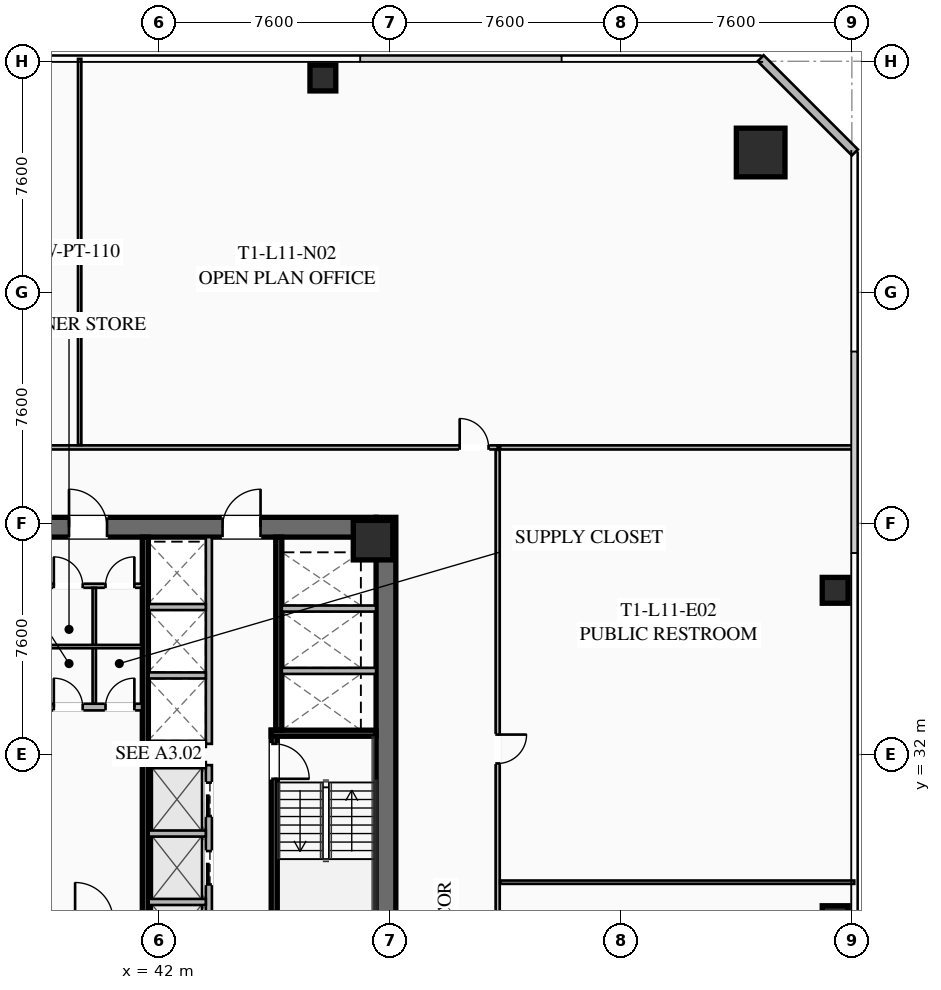
"""IFC4 building model, lengths in metres.
Left out: names, types, materials, properties, quantities, classifications, styles, units other than length and angle.
Written with IfcOpenShell. Run it as: python <this file> out.ifc"""

import sys

from ifc_helpers import new_model, si_unit, direction, frame, frame_2d, origin, origin_2d, place, context, subcontext, project, spatial, rectangle, hollow_rectangle, extrude, element, fill, save


model = new_model("IFC4")
c1 = context("Model", 3, precision=1e-05, world=origin(), true_north=direction((0.0, 1.0)))
c2 = subcontext(c1, "Body", "Model", "MODEL_VIEW")
j1 = project(units=[si_unit("LENGTHUNIT", "METRE"), si_unit("PLANEANGLEUNIT", "RADIAN")], contexts=[c1])
p1 = place(None, origin())
s1 = spatial("IfcSite", under=j1, at=p1, CompositionType="ELEMENT")
p2 = place(p1, origin())
s2 = spatial("IfcBuilding", under=s1, at=p2, CompositionType="ELEMENT")
p3 = place(p2, frame((0.0, 0.0, 45.9)))
s3 = spatial("IfcBuildingStorey", under=s2, at=p3, CompositionType="ELEMENT", Elevation=45.9)
p4 = place(p3, frame((49.475, 39.8, 0.0), z_axis=(0.0, 0.0, 1.0), x_axis=(0.0, -1.0, 0.0)))
e1 = element("IfcWall", 1, at=p4, inside=s3, PredefinedType="SHEAR", context=c2, shape_type="SweptSolid", body=[
    extrude(rectangle(XDim=15.6, YDim=0.65, at=frame_2d((7.8, 0.0))), origin(), (0.0, 0.0, 1.0), 3.55),
])
p5 = place(p3, frame((34.85, 39.475, 0.0), z_axis=(0.0, 0.0, 1.0), x_axis=(1.0, 0.0, 0.0)))
e2 = element("IfcWall", 2, at=p5, inside=s3, PredefinedType="SHEAR", context=c2, shape_type="SweptSolid", body=[
    extrude(rectangle(XDim=14.3, YDim=0.65, at=frame_2d((7.15, 0.0))), origin(), (0.0, 0.0, 1.0), 3.55),
])
p6 = place(p5, frame((4.2, 0.0, 0.0)))
e3 = element("IfcOpeningElement", 3, at=p6, cuts=e2, PredefinedType="OPENING", context=c2, shape_type="SweptSolid", body=[
    extrude(rectangle(XDim=1.25, YDim=2.25, at=frame_2d((0.625, 1.125))), frame((0.0, 0.335, 0.0), z_axis=(0.0, -1.0, 0.0), x_axis=(1.0, 0.0, 0.0)), (0.0, 0.0, 1.0), 0.67),
])
p7 = place(p5, frame((9.25, 0.0, 0.0)))
e4 = element("IfcOpeningElement", 4, at=p7, cuts=e2, PredefinedType="OPENING", context=c2, shape_type="SweptSolid", body=[
    extrude(rectangle(XDim=1.25, YDim=2.25, at=frame_2d((0.625, 1.125))), frame((0.0, 0.335, 0.0), z_axis=(0.0, -1.0, 0.0), x_axis=(1.0, 0.0, 0.0)), (0.0, 0.0, 1.0), 0.67),
])
p8 = place(p3, frame((49.05, 39.05, 0.0), z_axis=(0.0, 0.0, 1.0), x_axis=(1.0, 0.0, 0.0)))
e5 = element("IfcColumn", 5, at=p8, inside=s3, PredefinedType="COLUMN", context=c2, shape_type="SweptSolid", body=[
    extrude(hollow_rectangle(XDim=1.3, YDim=1.3, WallThickness=0.05, at=origin_2d()), origin(), (0.0, 0.0, 1.0), 3.35),
])
p9 = place(p3, frame((61.8, 51.8, 0.0), z_axis=(0.0, 0.0, 1.0), x_axis=(1.0, 0.0, 0.0)))
e6 = element("IfcColumn", 6, at=p9, inside=s3, PredefinedType="COLUMN", context=c2, shape_type="SweptSolid", body=[
    extrude(hollow_rectangle(XDim=1.6, YDim=1.6, WallThickness=0.06, at=origin_2d()), origin(), (0.0, 0.0, 1.0), 3.35),
])
for number, where, z_axis, x_axis in (
    (7, (64.25, 26.6, 0.0), (0.0, 0.0, 1.0), (1.0, 0.0, 0.0)),
    (8, (64.25, 37.4, 0.0), (0.0, 0.0, 1.0), (1.0, 0.0, 0.0)),
    (9, (47.4, 54.25, 0.0), (0.0, 0.0, 1.0), (1.0, 0.0, 0.0)),
):
    element("IfcColumn", number, at=place(p3, frame(where, z_axis=z_axis, x_axis=x_axis)), inside=s3, PredefinedType="COLUMN", context=c2, shape_type="SweptSolid", body=[
        extrude(hollow_rectangle(XDim=0.85, YDim=0.85, WallThickness=0.035, at=origin_2d()), origin(), (0.0, 0.0, 1.0), 3.35),
    ])
p10 = place(p3, frame((61.8, 54.9, 0.0), z_axis=(0.0, 0.0, 1.0), x_axis=(0.707106781187, -0.707106781187, 0.0)))
e10 = element("IfcWall", 10, at=p10, inside=s3, PredefinedType="SOLIDWALL", context=c2, shape_type="SweptSolid", body=[
    extrude(rectangle(XDim=4.384, YDim=0.28, at=frame_2d((2.192, 0.0))), origin(), (0.0, 0.0, 1.0), 3.35),
])
p11 = place(p3, frame((45.8, 32.8, 0.0), z_axis=(0.0, 0.0, 1.0), x_axis=(0.0, -1.0, 0.0)))
e11 = element("IfcWall", 11, at=p11, inside=s3, PredefinedType="SHEAR", context=c2, shape_type="SweptSolid", body=[
    extrude(rectangle(XDim=7.95, YDim=0.2, at=frame_2d((3.975, 0.0))), origin(), (0.0, 0.0, 1.0), 3.35),
])
p12 = place(p11, frame((0.45, 0.0, 0.0)))
e12 = element("IfcOpeningElement", 12, at=p12, cuts=e11, PredefinedType="OPENING", context=c2, shape_type="SweptSolid", body=[
    extrude(rectangle(XDim=1.15, YDim=2.2, at=frame_2d((0.575, 1.1))), frame((0.0, 0.11, 0.0), z_axis=(0.0, -1.0, 0.0), x_axis=(1.0, 0.0, 0.0)), (0.0, 0.0, 1.0), 0.22),
])
p13 = place(p3, frame((45.7, 32.7, 0.0), z_axis=(0.0, 0.0, 1.0), x_axis=(1.0, 0.0, 0.0)))
e13 = element("IfcWall", 13, at=p13, inside=s3, PredefinedType="SHEAR", context=c2, shape_type="SweptSolid", body=[
    extrude(rectangle(XDim=3.45, YDim=0.2, at=frame_2d((1.725, 0.0))), origin(), (0.0, 0.0, 1.0), 3.35),
])
p14 = place(p3, frame((41.56, 24.85, 0.0), z_axis=(0.0, 0.0, 1.0), x_axis=(0.0, 1.0, 0.0)))
e14 = element("IfcWall", 14, at=p14, inside=s3, PredefinedType="SHEAR", context=c2, shape_type="SweptSolid", body=[
    extrude(rectangle(XDim=14.3, YDim=0.2, at=frame_2d((7.15, 0.0))), origin(), (0.0, 0.0, 1.0), 3.35),
])
p15 = place(p3, frame((38.3, 33.56, 0.0), z_axis=(0.0, 0.0, 1.0), x_axis=(1.0, 0.0, 0.0)))
e15 = element("IfcWall", 15, at=p15, inside=s3, PredefinedType="SOLIDWALL", context=c2, shape_type="SweptSolid", body=[
    extrude(rectangle(XDim=3.15, YDim=0.22, at=frame_2d((1.575, 0.0))), origin(), (0.0, 0.0, 1.0), 2.703),
])
p16 = place(p15, frame((0.25, 0.0, 0.0)))
e16 = element("IfcOpeningElement", 16, at=p16, cuts=e15, PredefinedType="OPENING", context=c2, shape_type="SweptSolid", body=[
    extrude(rectangle(XDim=0.95, YDim=2.05, at=frame_2d((0.475, 1.025))), frame((0.0, 0.12, 0.0), z_axis=(0.0, -1.0, 0.0), x_axis=(1.0, 0.0, 0.0)), (0.0, 0.0, 1.0), 0.24),
])
p17 = place(p15, frame((1.95, 0.0, 0.0)))
e17 = element("IfcOpeningElement", 17, at=p17, cuts=e15, PredefinedType="OPENING", context=c2, shape_type="SweptSolid", body=[
    extrude(rectangle(XDim=0.95, YDim=2.05, at=frame_2d((0.475, 1.025))), frame((0.0, 0.12, 0.0), z_axis=(0.0, -1.0, 0.0), x_axis=(1.0, 0.0, 0.0)), (0.0, 0.0, 1.0), 0.24),
])
p18 = place(p3, frame((45.95, 39.15, 0.0), z_axis=(0.0, 0.0, 1.0), x_axis=(0.0, -1.0, 0.0)))
e18 = element("IfcWall", 18, at=p18, inside=s3, PredefinedType="SHEAR", context=c2, shape_type="SweptSolid", body=[
    extrude(rectangle(XDim=6.35, YDim=0.2, at=frame_2d((3.175, 0.0))), origin(), (0.0, 0.0, 1.0), 3.35),
])
for number, where, z_axis, x_axis in (
    (19, (46.05, 34.75, 0.0), (0.0, 0.0, 1.0), (1.0, 0.0, 0.0)),
    (20, (46.05, 36.8, 0.0), (0.0, 0.0, 1.0), (1.0, 0.0, 0.0)),
):
    element("IfcWall", number, at=place(p3, frame(where, z_axis=z_axis, x_axis=x_axis)), inside=s3, PredefinedType="SOLIDWALL", context=c2, shape_type="SweptSolid", body=[
        extrude(rectangle(XDim=3.1, YDim=0.2, at=frame_2d((1.55, 0.0))), origin(), (0.0, 0.0, 1.0), 3.35),
    ])
p19 = place(p3, frame((38.3, 37.55, 0.0), z_axis=(0.0, 0.0, 1.0), x_axis=(1.0, 0.0, 0.0)))
e21 = element("IfcWall", 21, at=p19, inside=s3, PredefinedType="PARTITIONING", context=c2, shape_type="SweptSolid", body=[
    extrude(rectangle(XDim=3.15, YDim=0.135, at=frame_2d((1.575, 0.0))), origin(), (0.0, 0.0, 1.0), 2.703),
])
p20 = place(p19, frame((0.25, 0.0, 0.0)))
e22 = element("IfcOpeningElement", 22, at=p20, cuts=e21, PredefinedType="OPENING", context=c2, shape_type="SweptSolid", body=[
    extrude(rectangle(XDim=0.95, YDim=2.05, at=frame_2d((0.475, 1.025))), frame((0.0, 0.077, 0.0), z_axis=(0.0, -1.0, 0.0), x_axis=(1.0, 0.0, 0.0)), (0.0, 0.0, 1.0), 0.155),
])
p21 = place(p19, frame((1.95, 0.0, 0.0)))
e23 = element("IfcOpeningElement", 23, at=p21, cuts=e21, PredefinedType="OPENING", context=c2, shape_type="SweptSolid", body=[
    extrude(rectangle(XDim=0.95, YDim=2.05, at=frame_2d((0.475, 1.025))), frame((0.0, 0.077, 0.0), z_axis=(0.0, -1.0, 0.0), x_axis=(1.0, 0.0, 0.0)), (0.0, 0.0, 1.0), 0.155),
])
p22 = place(p3, frame((39.88, 33.68, 0.0), z_axis=(0.0, 0.0, 1.0), x_axis=(0.0, 1.0, 0.0)))
e24 = element("IfcWall", 24, at=p22, inside=s3, PredefinedType="PARTITIONING", context=c2, shape_type="SweptSolid", body=[
    extrude(rectangle(XDim=3.8, YDim=0.11, at=frame_2d((1.9, 0.0))), origin(), (0.0, 0.0, 1.0), 2.703),
])
p23 = place(p3, frame((38.3, 35.55, 0.0), z_axis=(0.0, 0.0, 1.0), x_axis=(1.0, 0.0, 0.0)))
e25 = element("IfcWall", 25, at=p23, inside=s3, PredefinedType="PARTITIONING", context=c2, shape_type="SweptSolid", body=[
    extrude(rectangle(XDim=3.15, YDim=0.11, at=frame_2d((1.575, 0.0))), origin(), (0.0, 0.0, 1.0), 2.703),
])
p24 = place(p3, frame((43.65, 24.85, 0.0), z_axis=(0.0, 0.0, 1.0), x_axis=(0.0, 1.0, 0.0)))
e26 = element("IfcWall", 26, at=p24, inside=s3, PredefinedType="SOLIDWALL", context=c2, shape_type="SweptSolid", body=[
    extrude(rectangle(XDim=6.8, YDim=0.2, at=frame_2d((3.4, 0.0))), origin(), (0.0, 0.0, 1.0), 3.35),
])
p25 = place(p24, frame((0.625, 0.0, 0.0)))
e27 = element("IfcOpeningElement", 27, at=p25, cuts=e26, PredefinedType="OPENING", context=c2, shape_type="SweptSolid", body=[
    extrude(rectangle(XDim=1.1, YDim=2.2, at=frame_2d((0.55, 1.1))), frame((0.0, 0.11, 0.0), z_axis=(0.0, -1.0, 0.0), x_axis=(1.0, 0.0, 0.0)), (0.0, 0.0, 1.0), 0.22),
])
p26 = place(p24, frame((2.875, 0.0, 0.0)))
e28 = element("IfcOpeningElement", 28, at=p26, cuts=e26, PredefinedType="OPENING", context=c2, shape_type="SweptSolid", body=[
    extrude(rectangle(XDim=1.1, YDim=2.2, at=frame_2d((0.55, 1.1))), frame((0.0, 0.11, 0.0), z_axis=(0.0, -1.0, 0.0), x_axis=(1.0, 0.0, 0.0)), (0.0, 0.0, 1.0), 0.22),
])
p27 = place(p24, frame((5.125, 0.0, 0.0)))
e29 = element("IfcOpeningElement", 29, at=p27, cuts=e26, PredefinedType="OPENING", context=c2, shape_type="SweptSolid", body=[
    extrude(rectangle(XDim=1.1, YDim=2.2, at=frame_2d((0.55, 1.1))), frame((0.0, 0.11, 0.0), z_axis=(0.0, -1.0, 0.0), x_axis=(1.0, 0.0, 0.0)), (0.0, 0.0, 1.0), 0.22),
])
for number, where, z_axis, x_axis in (
    (30, (41.67, 27.15, 0.0), (0.0, 0.0, 1.0), (1.0, 0.0, 0.0)),
    (31, (41.67, 29.4, 0.0), (0.0, 0.0, 1.0), (1.0, 0.0, 0.0)),
    (32, (41.67, 31.65, 0.0), (0.0, 0.0, 1.0), (1.0, 0.0, 0.0)),
):
    element("IfcWall", number, at=place(p3, frame(where, z_axis=z_axis, x_axis=x_axis)), inside=s3, PredefinedType="SOLIDWALL", context=c2, shape_type="SweptSolid", body=[
        extrude(rectangle(XDim=1.88, YDim=0.2, at=frame_2d((0.94, 0.0))), origin(), (0.0, 0.0, 1.0), 3.35),
    ])
p28 = place(p3, frame((43.65, 32.35, 0.0), z_axis=(0.0, 0.0, 1.0), x_axis=(0.0, 1.0, 0.0)))
e33 = element("IfcWall", 33, at=p28, inside=s3, PredefinedType="SOLIDWALL", context=c2, shape_type="SweptSolid", body=[
    extrude(rectangle(XDim=6.8, YDim=0.2, at=frame_2d((3.4, 0.0))), origin(), (0.0, 0.0, 1.0), 3.35),
])
for number, where, z_axis, x_axis in (
    (34, (41.67, 32.35, 0.0), (0.0, 0.0, 1.0), (1.0, 0.0, 0.0)),
    (35, (41.67, 34.6, 0.0), (0.0, 0.0, 1.0), (1.0, 0.0, 0.0)),
    (36, (41.67, 36.85, 0.0), (0.0, 0.0, 1.0), (1.0, 0.0, 0.0)),
):
    element("IfcWall", number, at=place(p3, frame(where, z_axis=z_axis, x_axis=x_axis)), inside=s3, PredefinedType="SOLIDWALL", context=c2, shape_type="SweptSolid", body=[
        extrude(rectangle(XDim=1.88, YDim=0.2, at=frame_2d((0.94, 0.0))), origin(), (0.0, 0.0, 1.0), 3.35),
    ])
p29 = place(p3, frame((22.35, 42.1, 0.0), z_axis=(0.0, 0.0, 1.0), x_axis=(1.0, 0.0, 0.0)))
e37 = element("IfcWall", 37, at=p29, inside=s3, PredefinedType="PARTITIONING", context=c2, shape_type="SweptSolid", body=[
    extrude(rectangle(XDim=30.8, YDim=0.135, at=frame_2d((15.4, 0.0))), origin(), (0.0, 0.0, 1.0), 2.703),
])
p30 = place(p29, frame((0.3, 0.0, 0.0)))
e38 = element("IfcOpeningElement", 38, at=p30, cuts=e37, PredefinedType="OPENING", context=c2, shape_type="SweptSolid", body=[
    extrude(rectangle(XDim=0.95, YDim=2.05, at=frame_2d((0.475, 1.025))), frame((0.0, 0.077, 0.0), z_axis=(0.0, -1.0, 0.0), x_axis=(1.0, 0.0, 0.0)), (0.0, 0.0, 1.0), 0.155),
])
p31 = place(p29, frame((29.55, 0.0, 0.0)))
e39 = element("IfcOpeningElement", 39, at=p31, cuts=e37, PredefinedType="OPENING", context=c2, shape_type="SweptSolid", body=[
    extrude(rectangle(XDim=0.95, YDim=2.05, at=frame_2d((0.475, 1.025))), frame((0.0, 0.077, 0.0), z_axis=(0.0, -1.0, 0.0), x_axis=(1.0, 0.0, 0.0)), (0.0, 0.0, 1.0), 0.155),
])
p32 = place(p3, frame((39.4, 42.18, 0.0), z_axis=(0.0, 0.0, 1.0), x_axis=(0.0, 1.0, 0.0)))
e40 = element("IfcWall", 40, at=p32, inside=s3, PredefinedType="PARTITIONING", context=c2, shape_type="SweptSolid", body=[
    extrude(rectangle(XDim=12.7, YDim=0.11, at=frame_2d((6.35, 0.0))), origin(), (0.0, 0.0, 1.0), 2.703),
])
p33 = place(p3, frame((53.15, 42.02, 0.0), z_axis=(0.0, 0.0, 1.0), x_axis=(0.0, -1.0, 0.0)))
e41 = element("IfcWall", 41, at=p33, inside=s3, PredefinedType="PARTITIONING", context=c2, shape_type="SweptSolid", body=[
    extrude(rectangle(XDim=19.51, YDim=0.135, at=frame_2d((9.755, 0.0))), origin(), (0.0, 0.0, 1.0), 2.703),
])
p34 = place(p33, frame((18.26, 0.0, 0.0)))
e42 = element("IfcOpeningElement", 42, at=p34, cuts=e41, PredefinedType="OPENING", context=c2, shape_type="SweptSolid", body=[
    extrude(rectangle(XDim=0.95, YDim=2.05, at=frame_2d((0.475, 1.025))), frame((0.0, 0.077, 0.0), z_axis=(0.0, -1.0, 0.0), x_axis=(1.0, 0.0, 0.0)), (0.0, 0.0, 1.0), 0.155),
])
p35 = place(p33, frame((9.365, 0.0, 0.0)))
e43 = element("IfcOpeningElement", 43, at=p35, cuts=e41, PredefinedType="OPENING", context=c2, shape_type="SweptSolid", body=[
    extrude(rectangle(XDim=0.95, YDim=2.05, at=frame_2d((0.475, 1.025))), frame((0.0, 0.077, 0.0), z_axis=(0.0, -1.0, 0.0), x_axis=(1.0, 0.0, 0.0)), (0.0, 0.0, 1.0), 0.155),
])
p36 = place(p3, frame((64.88, 42.1, 0.0), z_axis=(0.0, 0.0, 1.0), x_axis=(-1.0, 0.0, 0.0)))
e44 = element("IfcWall", 44, at=p36, inside=s3, PredefinedType="PARTITIONING", context=c2, shape_type="SweptSolid", body=[
    extrude(rectangle(XDim=11.65, YDim=0.135, at=frame_2d((5.825, 0.0))), origin(), (0.0, 0.0, 1.0), 2.703),
])
p37 = place(p3, frame((53.23, 27.8, 0.0), z_axis=(0.0, 0.0, 1.0), x_axis=(1.0, 0.0, 0.0)))
e45 = element("IfcWall", 45, at=p37, inside=s3, PredefinedType="PARTITIONING", context=c2, shape_type="SweptSolid", body=[
    extrude(rectangle(XDim=11.65, YDim=0.11, at=frame_2d((5.825, 0.0))), origin(), (0.0, 0.0, 1.0), 2.703),
])
p38 = place(p6, origin())
e46 = element("IfcDoor", 46, at=p38, inside=s3, OperationType="SINGLE_SWING_LEFT", PredefinedType="DOOR", context=c2, shape_type="SweptSolid", body=[
    extrude(rectangle(XDim=1.25, YDim=2.25, at=frame_2d((0.625, 1.125))), frame((0.0, 0.025, 0.0), z_axis=(0.0, -1.0, 0.0), x_axis=(1.0, 0.0, 0.0)), (0.0, 0.0, 1.0), 0.05),
])
fill(e3, e46)
p39 = place(p7, origin())
e47 = element("IfcDoor", 47, at=p39, inside=s3, OperationType="SINGLE_SWING_RIGHT", PredefinedType="DOOR", context=c2, shape_type="SweptSolid", body=[
    extrude(rectangle(XDim=1.25, YDim=2.25, at=frame_2d((0.625, 1.125))), frame((0.0, 0.025, 0.0), z_axis=(0.0, -1.0, 0.0), x_axis=(1.0, 0.0, 0.0)), (0.0, 0.0, 1.0), 0.05),
])
fill(e4, e47)
p40 = place(p12, origin())
e48 = element("IfcDoor", 48, at=p40, inside=s3, OperationType="SINGLE_SWING_RIGHT", PredefinedType="DOOR", context=c2, shape_type="SweptSolid", body=[
    extrude(rectangle(XDim=1.15, YDim=2.2, at=frame_2d((0.575, 1.1))), frame((0.0, 0.025, 0.0), z_axis=(0.0, -1.0, 0.0), x_axis=(1.0, 0.0, 0.0)), (0.0, 0.0, 1.0), 0.05),
])
fill(e12, e48)
p41 = place(p20, origin())
e49 = element("IfcDoor", 49, at=p41, inside=s3, OperationType="SINGLE_SWING_LEFT", PredefinedType="DOOR", context=c2, shape_type="SweptSolid", body=[
    extrude(rectangle(XDim=0.95, YDim=2.05, at=frame_2d((0.475, 1.025))), frame((0.0, 0.025, 0.0), z_axis=(0.0, -1.0, 0.0), x_axis=(1.0, 0.0, 0.0)), (0.0, 0.0, 1.0), 0.05),
])
fill(e22, e49)
p42 = place(p21, origin())
e50 = element("IfcDoor", 50, at=p42, inside=s3, OperationType="SINGLE_SWING_RIGHT", PredefinedType="DOOR", context=c2, shape_type="SweptSolid", body=[
    extrude(rectangle(XDim=0.95, YDim=2.05, at=frame_2d((0.475, 1.025))), frame((0.0, 0.025, 0.0), z_axis=(0.0, -1.0, 0.0), x_axis=(1.0, 0.0, 0.0)), (0.0, 0.0, 1.0), 0.05),
])
fill(e23, e50)
p43 = place(p16, origin())
e51 = element("IfcDoor", 51, at=p43, inside=s3, OperationType="SINGLE_SWING_LEFT", PredefinedType="DOOR", context=c2, shape_type="SweptSolid", body=[
    extrude(rectangle(XDim=0.95, YDim=2.05, at=frame_2d((0.475, 1.025))), frame((0.0, 0.025, 0.0), z_axis=(0.0, -1.0, 0.0), x_axis=(1.0, 0.0, 0.0)), (0.0, 0.0, 1.0), 0.05),
])
fill(e16, e51)
p44 = place(p17, origin())
e52 = element("IfcDoor", 52, at=p44, inside=s3, OperationType="SINGLE_SWING_RIGHT", PredefinedType="DOOR", context=c2, shape_type="SweptSolid", body=[
    extrude(rectangle(XDim=0.95, YDim=2.05, at=frame_2d((0.475, 1.025))), frame((0.0, 0.025, 0.0), z_axis=(0.0, -1.0, 0.0), x_axis=(1.0, 0.0, 0.0)), (0.0, 0.0, 1.0), 0.05),
])
fill(e17, e52)
p45 = place(p31, origin())
e53 = element("IfcDoor", 53, at=p45, inside=s3, OperationType="SINGLE_SWING_LEFT", PredefinedType="DOOR", context=c2, shape_type="SweptSolid", body=[
    extrude(rectangle(XDim=0.95, YDim=2.05, at=frame_2d((0.475, 1.025))), frame((0.0, 0.025, 0.0), z_axis=(0.0, -1.0, 0.0), x_axis=(1.0, 0.0, 0.0)), (0.0, 0.0, 1.0), 0.05),
])
fill(e39, e53)
p46 = place(p35, origin())
e54 = element("IfcDoor", 54, at=p46, inside=s3, OperationType="SINGLE_SWING_LEFT", PredefinedType="DOOR", context=c2, shape_type="SweptSolid", body=[
    extrude(rectangle(XDim=0.95, YDim=2.05, at=frame_2d((0.475, 1.025))), frame((0.0, 0.025, 0.0), z_axis=(0.0, -1.0, 0.0), x_axis=(1.0, 0.0, 0.0)), (0.0, 0.0, 1.0), 0.05),
])
fill(e43, e54)
p47 = place(p26, origin())
e55 = element("IfcDoor", 55, at=p47, inside=s3, OperationType="SLIDING_TO_LEFT", PredefinedType="DOOR", context=c2, shape_type="SweptSolid", body=[
    extrude(rectangle(XDim=1.1, YDim=2.2, at=frame_2d((0.55, 1.1))), frame((0.0, 0.025, 0.0), z_axis=(0.0, -1.0, 0.0), x_axis=(1.0, 0.0, 0.0)), (0.0, 0.0, 1.0), 0.05),
])
fill(e28, e55)
p48 = place(p27, origin())
e56 = element("IfcDoor", 56, at=p48, inside=s3, OperationType="SLIDING_TO_LEFT", PredefinedType="DOOR", context=c2, shape_type="SweptSolid", body=[
    extrude(rectangle(XDim=1.1, YDim=2.2, at=frame_2d((0.55, 1.1))), frame((0.0, 0.025, 0.0), z_axis=(0.0, -1.0, 0.0), x_axis=(1.0, 0.0, 0.0)), (0.0, 0.0, 1.0), 0.05),
])
fill(e29, e56)
save(model, sys.argv[1])
